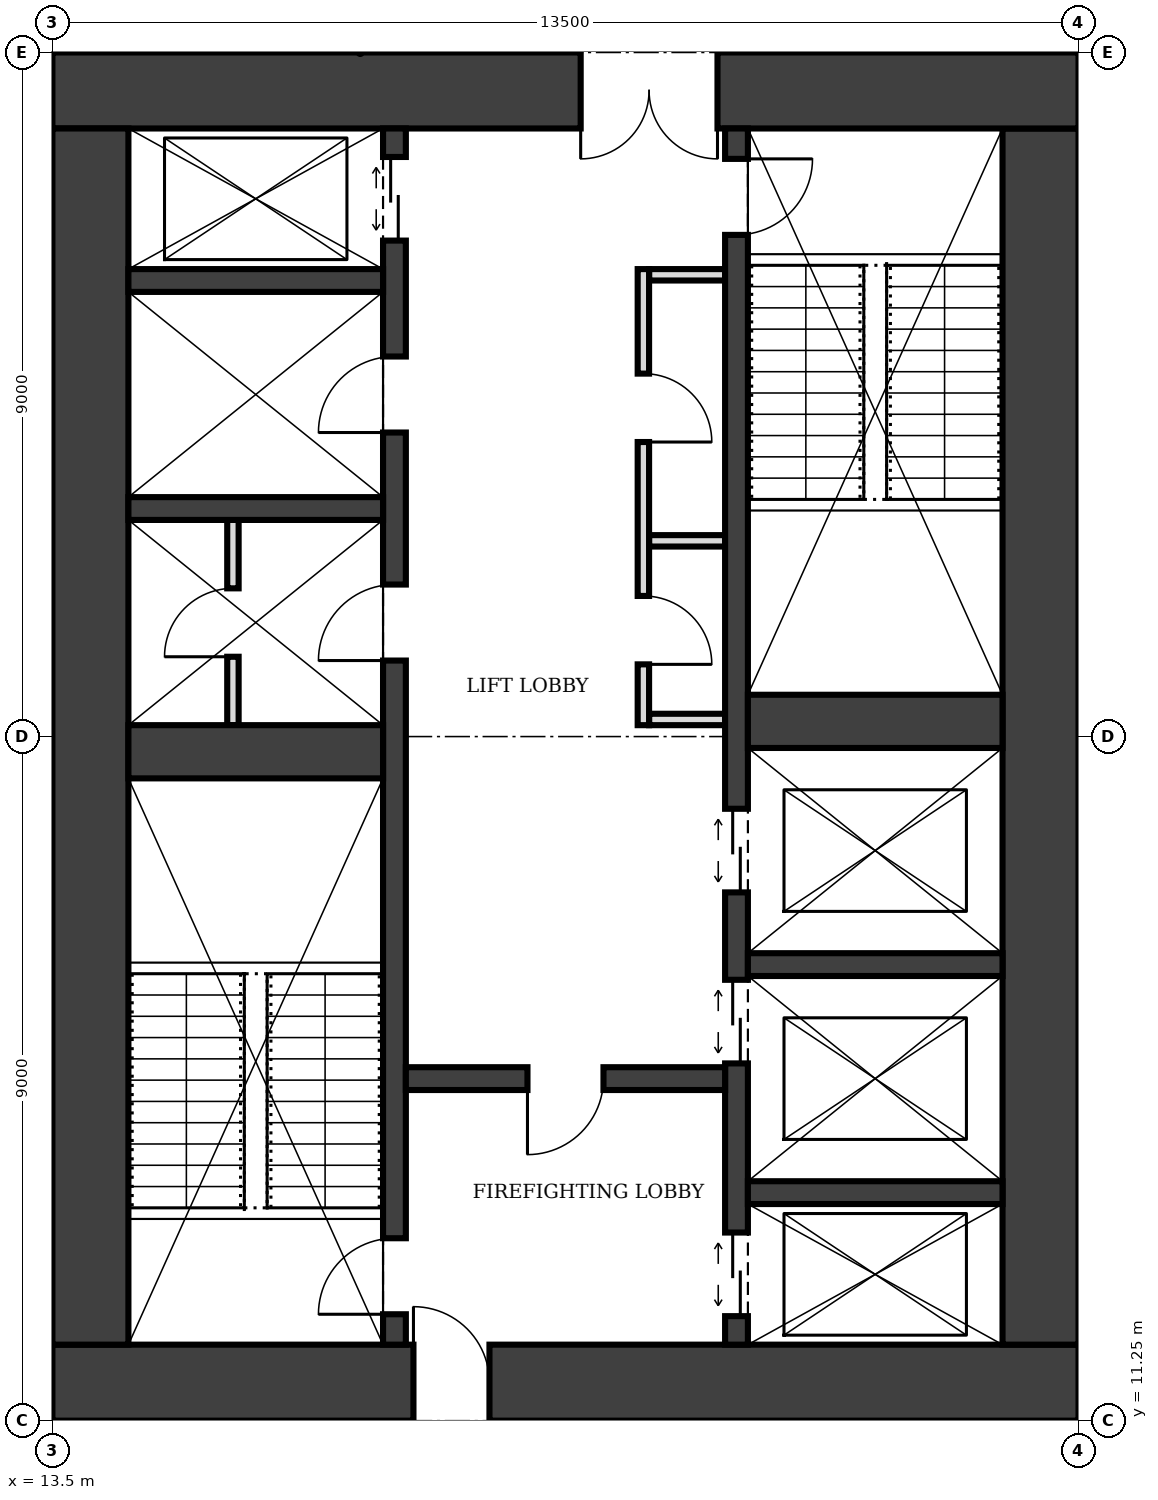
"""IFC4 building model, lengths in metres.
Left out: names, types, materials, properties, quantities, classifications, styles, units other than length and angle.
Written with IfcOpenShell. Run it as: python <this file> out.ifc"""

import sys

from ifc_helpers import new_model, si_unit, direction, frame, frame_2d, origin, place, context, subcontext, project, spatial, rectangle, extrude, element, fill, save


model = new_model("IFC4")
c1 = context("Model", 3, precision=1e-05, world=origin(), true_north=direction((0.0, 1.0)))
c2 = subcontext(c1, "Body", "Model", "MODEL_VIEW")
j1 = project(units=[si_unit("LENGTHUNIT", "METRE"), si_unit("PLANEANGLEUNIT", "RADIAN")], contexts=[c1])
p1 = place(None, origin())
s1 = spatial("IfcSite", under=j1, at=p1, CompositionType="ELEMENT")
p2 = place(p1, origin())
s2 = spatial("IfcBuilding", under=s1, at=p2, CompositionType="ELEMENT")
p3 = place(p2, frame((0.0, 0.0, 277.0)))
s3 = spatial("IfcBuildingStorey", under=s2, at=p3, CompositionType="ELEMENT", Elevation=277.0)
p4 = place(p3, frame((13.5, 11.75, 0.0), z_axis=(0.0, 0.0, 1.0), x_axis=(1.0, 0.0, 0.0)))
e1 = element("IfcWall", 1, at=p4, inside=s3, PredefinedType="SHEAR", context=c2, shape_type="SweptSolid", body=[
    extrude(rectangle(XDim=13.5, YDim=1.0, at=frame_2d((6.75, 0.0))), origin(), (0.0, 0.0, 1.0), 4.0),
])
p5 = place(p4, frame((4.75, 0.0, 0.0)))
e2 = element("IfcOpeningElement", 2, at=p5, cuts=e1, PredefinedType="OPENING", context=c2, shape_type="SweptSolid", body=[
    extrude(rectangle(XDim=1.0, YDim=2.1, at=frame_2d((0.5, 1.05))), frame((0.0, 0.51, 0.0), z_axis=(0.0, -1.0, 0.0), x_axis=(1.0, 0.0, 0.0)), (0.0, 0.0, 1.0), 1.02),
])
p6 = place(p3, frame((26.5, 12.25, 0.0), z_axis=(0.0, 0.0, 1.0), x_axis=(0.0, 1.0, 0.0)))
e3 = element("IfcWall", 3, at=p6, inside=s3, PredefinedType="SHEAR", context=c2, shape_type="SweptSolid", body=[
    extrude(rectangle(XDim=16.0, YDim=1.0, at=frame_2d((8.0, 0.0))), origin(), (0.0, 0.0, 1.0), 4.0),
])
p7 = place(p3, frame((27.0, 28.75, 0.0), z_axis=(0.0, 0.0, 1.0), x_axis=(-1.0, 0.0, 0.0)))
e4 = element("IfcWall", 4, at=p7, inside=s3, PredefinedType="SHEAR", context=c2, shape_type="SweptSolid", body=[
    extrude(rectangle(XDim=13.5, YDim=1.0, at=frame_2d((6.75, 0.0))), origin(), (0.0, 0.0, 1.0), 4.0),
])
p8 = place(p7, frame((4.75, 0.0, 0.0)))
e5 = element("IfcOpeningElement", 5, at=p8, cuts=e4, PredefinedType="OPENING", context=c2, shape_type="SweptSolid", body=[
    extrude(rectangle(XDim=1.8, YDim=2.1, at=frame_2d((0.9, 1.05))), frame((0.0, 0.51, 0.0), z_axis=(0.0, -1.0, 0.0), x_axis=(1.0, 0.0, 0.0)), (0.0, 0.0, 1.0), 1.02),
])
p9 = place(p3, frame((14.0, 28.25, 0.0), z_axis=(0.0, 0.0, 1.0), x_axis=(0.0, -1.0, 0.0)))
e6 = element("IfcWall", 6, at=p9, inside=s3, PredefinedType="SHEAR", context=c2, shape_type="SweptSolid", body=[
    extrude(rectangle(XDim=16.0, YDim=1.0, at=frame_2d((8.0, 0.0))), origin(), (0.0, 0.0, 1.0), 4.0),
])
p10 = place(p3, frame((18.0, 12.25, 0.0), z_axis=(0.0, 0.0, 1.0), x_axis=(0.0, 1.0, 0.0)))
e7 = element("IfcWall", 7, at=p10, inside=s3, PredefinedType="SHEAR", context=c2, shape_type="SweptSolid", body=[
    extrude(rectangle(XDim=16.0, YDim=0.3, at=frame_2d((8.0, 0.0))), origin(), (0.0, 0.0, 1.0), 4.0),
])
p11 = place(p10, frame((0.4, 0.0, 0.0)))
e8 = element("IfcOpeningElement", 8, at=p11, cuts=e7, PredefinedType="OPENING", context=c2, shape_type="SweptSolid", body=[
    extrude(rectangle(XDim=1.0, YDim=2.1, at=frame_2d((0.5, 1.05))), frame((0.0, 0.16, 0.0), z_axis=(0.0, -1.0, 0.0), x_axis=(1.0, 0.0, 0.0)), (0.0, 0.0, 1.0), 0.32),
])
p12 = place(p10, frame((14.525, 0.0, 0.0)))
e9 = element("IfcOpeningElement", 9, at=p12, cuts=e7, PredefinedType="OPENING", context=c2, shape_type="SweptSolid", body=[
    extrude(rectangle(XDim=1.1, YDim=2.1, at=frame_2d((0.55, 1.05))), frame((0.0, 0.16, 0.0), z_axis=(0.0, -1.0, 0.0), x_axis=(1.0, 0.0, 0.0)), (0.0, 0.0, 1.0), 0.32),
])
p13 = place(p10, frame((9.0, 0.0, 0.0)))
e10 = element("IfcOpeningElement", 10, at=p13, cuts=e7, PredefinedType="OPENING", context=c2, shape_type="SweptSolid", body=[
    extrude(rectangle(XDim=1.0, YDim=2.1, at=frame_2d((0.5, 1.05))), frame((0.0, 0.16, 0.0), z_axis=(0.0, -1.0, 0.0), x_axis=(1.0, 0.0, 0.0)), (0.0, 0.0, 1.0), 0.32),
])
p14 = place(p10, frame((12.0, 0.0, 0.0)))
e11 = element("IfcOpeningElement", 11, at=p14, cuts=e7, PredefinedType="OPENING", context=c2, shape_type="SweptSolid", body=[
    extrude(rectangle(XDim=1.0, YDim=2.1, at=frame_2d((0.5, 1.05))), frame((0.0, 0.16, 0.0), z_axis=(0.0, -1.0, 0.0), x_axis=(1.0, 0.0, 0.0)), (0.0, 0.0, 1.0), 0.32),
])
p15 = place(p3, frame((22.5, 12.25, 0.0), z_axis=(0.0, 0.0, 1.0), x_axis=(0.0, 1.0, 0.0)))
e12 = element("IfcWall", 12, at=p15, inside=s3, PredefinedType="SHEAR", context=c2, shape_type="SweptSolid", body=[
    extrude(rectangle(XDim=16.0, YDim=0.3, at=frame_2d((8.0, 0.0))), origin(), (0.0, 0.0, 1.0), 4.0),
])
p16 = place(p15, frame((14.6, 0.0, 0.0)))
e13 = element("IfcOpeningElement", 13, at=p16, cuts=e12, PredefinedType="OPENING", context=c2, shape_type="SweptSolid", body=[
    extrude(rectangle(XDim=1.0, YDim=2.1, at=frame_2d((0.5, 1.05))), frame((0.0, 0.16, 0.0), z_axis=(0.0, -1.0, 0.0), x_axis=(1.0, 0.0, 0.0)), (0.0, 0.0, 1.0), 0.32),
])
p17 = place(p15, frame((0.375, 0.0, 0.0)))
e14 = element("IfcOpeningElement", 14, at=p17, cuts=e12, PredefinedType="OPENING", context=c2, shape_type="SweptSolid", body=[
    extrude(rectangle(XDim=1.1, YDim=2.1, at=frame_2d((0.55, 1.05))), frame((0.0, 0.16, 0.0), z_axis=(0.0, -1.0, 0.0), x_axis=(1.0, 0.0, 0.0)), (0.0, 0.0, 1.0), 0.32),
])
p18 = place(p15, frame((3.7, 0.0, 0.0)))
e15 = element("IfcOpeningElement", 15, at=p18, cuts=e12, PredefinedType="OPENING", context=c2, shape_type="SweptSolid", body=[
    extrude(rectangle(XDim=1.1, YDim=2.1, at=frame_2d((0.55, 1.05))), frame((0.0, 0.16, 0.0), z_axis=(0.0, -1.0, 0.0), x_axis=(1.0, 0.0, 0.0)), (0.0, 0.0, 1.0), 0.32),
])
p19 = place(p15, frame((5.95, 0.0, 0.0)))
e16 = element("IfcOpeningElement", 16, at=p19, cuts=e12, PredefinedType="OPENING", context=c2, shape_type="SweptSolid", body=[
    extrude(rectangle(XDim=1.1, YDim=2.1, at=frame_2d((0.55, 1.05))), frame((0.0, 0.16, 0.0), z_axis=(0.0, -1.0, 0.0), x_axis=(1.0, 0.0, 0.0)), (0.0, 0.0, 1.0), 0.32),
])
p20 = place(p3, frame((14.5, 20.05, 0.0), z_axis=(0.0, 0.0, 1.0), x_axis=(1.0, 0.0, 0.0)))
e17 = element("IfcWall", 17, at=p20, inside=s3, PredefinedType="SHEAR", context=c2, shape_type="SweptSolid", body=[
    extrude(rectangle(XDim=3.35, YDim=0.7, at=frame_2d((1.675, 0.0))), origin(), (0.0, 0.0, 1.0), 4.0),
])
p21 = place(p3, frame((18.15, 15.75, 0.0), z_axis=(0.0, 0.0, 1.0), x_axis=(1.0, 0.0, 0.0)))
e18 = element("IfcWall", 18, at=p21, inside=s3, PredefinedType="SHEAR", context=c2, shape_type="SweptSolid", body=[
    extrude(rectangle(XDim=4.2, YDim=0.3, at=frame_2d((2.1, 0.0))), origin(), (0.0, 0.0, 1.0), 4.0),
])
p22 = place(p21, frame((1.6, 0.0, 0.0)))
e19 = element("IfcOpeningElement", 19, at=p22, cuts=e18, PredefinedType="OPENING", context=c2, shape_type="SweptSolid", body=[
    extrude(rectangle(XDim=1.0, YDim=2.1, at=frame_2d((0.5, 1.05))), frame((0.0, 0.16, 0.0), z_axis=(0.0, -1.0, 0.0), x_axis=(1.0, 0.0, 0.0)), (0.0, 0.0, 1.0), 0.32),
])
for number, where, z_axis, x_axis in (
    (20, (22.65, 14.25, 0.0), (0.0, 0.0, 1.0), (1.0, 0.0, 0.0)),
    (21, (22.65, 17.25, 0.0), (0.0, 0.0, 1.0), (1.0, 0.0, 0.0)),
):
    element("IfcWall", number, at=place(p3, frame(where, z_axis=z_axis, x_axis=x_axis)), inside=s3, PredefinedType="SHEAR", context=c2, shape_type="SweptSolid", body=[
        extrude(rectangle(XDim=3.35, YDim=0.3, at=frame_2d((1.675, 0.0))), origin(), (0.0, 0.0, 1.0), 4.0),
    ])
p23 = place(p3, frame((22.65, 20.45, 0.0), z_axis=(0.0, 0.0, 1.0), x_axis=(1.0, 0.0, 0.0)))
e22 = element("IfcWall", 22, at=p23, inside=s3, PredefinedType="SHEAR", context=c2, shape_type="SweptSolid", body=[
    extrude(rectangle(XDim=3.35, YDim=0.7, at=frame_2d((1.675, 0.0))), origin(), (0.0, 0.0, 1.0), 4.0),
])
for number, where, z_axis, x_axis in (
    (23, (14.5, 23.25, 0.0), (0.0, 0.0, 1.0), (1.0, 0.0, 0.0)),
    (24, (14.5, 26.25, 0.0), (0.0, 0.0, 1.0), (1.0, 0.0, 0.0)),
):
    element("IfcWall", number, at=place(p3, frame(where, z_axis=z_axis, x_axis=x_axis)), inside=s3, PredefinedType="SHEAR", context=c2, shape_type="SweptSolid", body=[
        extrude(rectangle(XDim=3.35, YDim=0.3, at=frame_2d((1.675, 0.0))), origin(), (0.0, 0.0, 1.0), 4.0),
    ])
p24 = place(p3, frame((21.275, 20.4, 0.0), z_axis=(0.0, 0.0, 1.0), x_axis=(0.0, 1.0, 0.0)))
e25 = element("IfcWall", 25, at=p24, inside=s3, PredefinedType="PARTITIONING", context=c2, shape_type="SweptSolid", body=[
    extrude(rectangle(XDim=6.0, YDim=0.15, at=frame_2d((3.0, 0.0))), origin(), (0.0, 0.0, 1.0), 3.75),
])
p25 = place(p24, frame((0.8, 0.0, 0.0)))
e26 = element("IfcOpeningElement", 26, at=p25, cuts=e25, PredefinedType="OPENING", context=c2, shape_type="SweptSolid", body=[
    extrude(rectangle(XDim=0.9, YDim=2.1, at=frame_2d((0.45, 1.05))), frame((0.0, 0.085, 0.0), z_axis=(0.0, -1.0, 0.0), x_axis=(1.0, 0.0, 0.0)), (0.0, 0.0, 1.0), 0.17),
])
p26 = place(p24, frame((3.725, 0.0, 0.0)))
e27 = element("IfcOpeningElement", 27, at=p26, cuts=e25, PredefinedType="OPENING", context=c2, shape_type="SweptSolid", body=[
    extrude(rectangle(XDim=0.9, YDim=2.1, at=frame_2d((0.45, 1.05))), frame((0.0, 0.085, 0.0), z_axis=(0.0, -1.0, 0.0), x_axis=(1.0, 0.0, 0.0)), (0.0, 0.0, 1.0), 0.17),
])
for number, where, z_axis, x_axis in (
    (28, (21.35, 20.475, 0.0), (0.0, 0.0, 1.0), (1.0, 0.0, 0.0)),
    (29, (21.35, 22.825, 0.0), (0.0, 0.0, 1.0), (1.0, 0.0, 0.0)),
    (30, (21.35, 26.325, 0.0), (0.0, 0.0, 1.0), (1.0, 0.0, 0.0)),
):
    element("IfcWall", number, at=place(p3, frame(where, z_axis=z_axis, x_axis=x_axis)), inside=s3, PredefinedType="PARTITIONING", context=c2, shape_type="SweptSolid", body=[
        extrude(rectangle(XDim=1.0, YDim=0.15, at=frame_2d((0.5, 0.0))), origin(), (0.0, 0.0, 1.0), 3.75),
    ])
p27 = place(p3, frame((15.875, 20.4, 0.0), z_axis=(0.0, 0.0, 1.0), x_axis=(0.0, 1.0, 0.0)))
e31 = element("IfcWall", 31, at=p27, inside=s3, PredefinedType="PARTITIONING", context=c2, shape_type="SweptSolid", body=[
    extrude(rectangle(XDim=2.7, YDim=0.15, at=frame_2d((1.35, 0.0))), origin(), (0.0, 0.0, 1.0), 3.75),
])
p28 = place(p27, frame((0.9, 0.0, 0.0)))
e32 = element("IfcOpeningElement", 32, at=p28, cuts=e31, PredefinedType="OPENING", context=c2, shape_type="SweptSolid", body=[
    extrude(rectangle(XDim=0.9, YDim=2.1, at=frame_2d((0.45, 1.05))), frame((0.0, 0.085, 0.0), z_axis=(0.0, -1.0, 0.0), x_axis=(1.0, 0.0, 0.0)), (0.0, 0.0, 1.0), 0.17),
])
p29 = place(p5, origin())
e33 = element("IfcDoor", 33, at=p29, inside=s3, OperationType="SINGLE_SWING_LEFT", PredefinedType="DOOR", context=c2, shape_type="SweptSolid", body=[
    extrude(rectangle(XDim=1.0, YDim=2.1, at=frame_2d((0.5, 1.05))), frame((0.0, 0.025, 0.0), z_axis=(0.0, -1.0, 0.0), x_axis=(1.0, 0.0, 0.0)), (0.0, 0.0, 1.0), 0.05),
])
fill(e2, e33)
p30 = place(p8, origin())
e34 = element("IfcDoor", 34, at=p30, inside=s3, OperationType="DOUBLE_DOOR_SINGLE_SWING", PredefinedType="DOOR", context=c2, shape_type="SweptSolid", body=[
    extrude(rectangle(XDim=1.8, YDim=2.1, at=frame_2d((0.9, 1.05))), frame((0.0, 0.025, 0.0), z_axis=(0.0, -1.0, 0.0), x_axis=(1.0, 0.0, 0.0)), (0.0, 0.0, 1.0), 0.05),
])
fill(e5, e34)
p31 = place(p22, frame((1.0, 0.0, 0.0), z_axis=(0.0, 0.0, 1.0), x_axis=(-1.0, 0.0, 0.0)))
e35 = element("IfcDoor", 35, at=p31, inside=s3, OperationType="SINGLE_SWING_RIGHT", PredefinedType="DOOR", context=c2, shape_type="SweptSolid", body=[
    extrude(rectangle(XDim=1.0, YDim=2.1, at=frame_2d((0.5, 1.05))), frame((0.0, 0.025, 0.0), z_axis=(0.0, -1.0, 0.0), x_axis=(1.0, 0.0, 0.0)), (0.0, 0.0, 1.0), 0.05),
])
fill(e19, e35)
p32 = place(p11, origin())
e36 = element("IfcDoor", 36, at=p32, inside=s3, OperationType="SINGLE_SWING_LEFT", PredefinedType="DOOR", context=c2, shape_type="SweptSolid", body=[
    extrude(rectangle(XDim=1.0, YDim=2.1, at=frame_2d((0.5, 1.05))), frame((0.0, 0.025, 0.0), z_axis=(0.0, -1.0, 0.0), x_axis=(1.0, 0.0, 0.0)), (0.0, 0.0, 1.0), 0.05),
])
fill(e8, e36)
p33 = place(p16, frame((1.0, 0.0, 0.0), z_axis=(0.0, 0.0, 1.0), x_axis=(-1.0, 0.0, 0.0)))
e37 = element("IfcDoor", 37, at=p33, inside=s3, OperationType="SINGLE_SWING_LEFT", PredefinedType="DOOR", context=c2, shape_type="SweptSolid", body=[
    extrude(rectangle(XDim=1.0, YDim=2.1, at=frame_2d((0.5, 1.05))), frame((0.0, 0.025, 0.0), z_axis=(0.0, -1.0, 0.0), x_axis=(1.0, 0.0, 0.0)), (0.0, 0.0, 1.0), 0.05),
])
fill(e13, e37)
p34 = place(p17, origin())
e38 = element("IfcDoor", 38, at=p34, inside=s3, OperationType="DOUBLE_DOOR_SLIDING", PredefinedType="DOOR", context=c2, shape_type="SweptSolid", body=[
    extrude(rectangle(XDim=1.1, YDim=2.1, at=frame_2d((0.55, 1.05))), frame((0.0, 0.025, 0.0), z_axis=(0.0, -1.0, 0.0), x_axis=(1.0, 0.0, 0.0)), (0.0, 0.0, 1.0), 0.05),
])
fill(e14, e38)
p35 = place(p12, origin())
e39 = element("IfcDoor", 39, at=p35, inside=s3, OperationType="DOUBLE_DOOR_SLIDING", PredefinedType="DOOR", context=c2, shape_type="SweptSolid", body=[
    extrude(rectangle(XDim=1.1, YDim=2.1, at=frame_2d((0.55, 1.05))), frame((0.0, 0.025, 0.0), z_axis=(0.0, -1.0, 0.0), x_axis=(1.0, 0.0, 0.0)), (0.0, 0.0, 1.0), 0.05),
])
fill(e9, e39)
p36 = place(p18, origin())
e40 = element("IfcDoor", 40, at=p36, inside=s3, OperationType="DOUBLE_DOOR_SLIDING", PredefinedType="DOOR", context=c2, shape_type="SweptSolid", body=[
    extrude(rectangle(XDim=1.1, YDim=2.1, at=frame_2d((0.55, 1.05))), frame((0.0, 0.025, 0.0), z_axis=(0.0, -1.0, 0.0), x_axis=(1.0, 0.0, 0.0)), (0.0, 0.0, 1.0), 0.05),
])
fill(e15, e40)
p37 = place(p19, origin())
e41 = element("IfcDoor", 41, at=p37, inside=s3, OperationType="DOUBLE_DOOR_SLIDING", PredefinedType="DOOR", context=c2, shape_type="SweptSolid", body=[
    extrude(rectangle(XDim=1.1, YDim=2.1, at=frame_2d((0.55, 1.05))), frame((0.0, 0.025, 0.0), z_axis=(0.0, -1.0, 0.0), x_axis=(1.0, 0.0, 0.0)), (0.0, 0.0, 1.0), 0.05),
])
fill(e16, e41)
p38 = place(p25, frame((0.9, 0.0, 0.0), z_axis=(0.0, 0.0, 1.0), x_axis=(-1.0, 0.0, 0.0)))
e42 = element("IfcDoor", 42, at=p38, inside=s3, OperationType="SINGLE_SWING_RIGHT", PredefinedType="DOOR", context=c2, shape_type="SweptSolid", body=[
    extrude(rectangle(XDim=0.9, YDim=2.1, at=frame_2d((0.45, 1.05))), frame((0.0, 0.025, 0.0), z_axis=(0.0, -1.0, 0.0), x_axis=(1.0, 0.0, 0.0)), (0.0, 0.0, 1.0), 0.05),
])
fill(e26, e42)
p39 = place(p26, frame((0.9, 0.0, 0.0), z_axis=(0.0, 0.0, 1.0), x_axis=(-1.0, 0.0, 0.0)))
e43 = element("IfcDoor", 43, at=p39, inside=s3, OperationType="SINGLE_SWING_RIGHT", PredefinedType="DOOR", context=c2, shape_type="SweptSolid", body=[
    extrude(rectangle(XDim=0.9, YDim=2.1, at=frame_2d((0.45, 1.05))), frame((0.0, 0.025, 0.0), z_axis=(0.0, -1.0, 0.0), x_axis=(1.0, 0.0, 0.0)), (0.0, 0.0, 1.0), 0.05),
])
fill(e27, e43)
p40 = place(p13, origin())
e44 = element("IfcDoor", 44, at=p40, inside=s3, OperationType="SINGLE_SWING_LEFT", PredefinedType="DOOR", context=c2, shape_type="SweptSolid", body=[
    extrude(rectangle(XDim=1.0, YDim=2.1, at=frame_2d((0.5, 1.05))), frame((0.0, 0.025, 0.0), z_axis=(0.0, -1.0, 0.0), x_axis=(1.0, 0.0, 0.0)), (0.0, 0.0, 1.0), 0.05),
])
fill(e10, e44)
p41 = place(p28, origin())
e45 = element("IfcDoor", 45, at=p41, inside=s3, OperationType="SINGLE_SWING_LEFT", PredefinedType="DOOR", context=c2, shape_type="SweptSolid", body=[
    extrude(rectangle(XDim=0.9, YDim=2.1, at=frame_2d((0.45, 1.05))), frame((0.0, 0.025, 0.0), z_axis=(0.0, -1.0, 0.0), x_axis=(1.0, 0.0, 0.0)), (0.0, 0.0, 1.0), 0.05),
])
fill(e32, e45)
p42 = place(p14, origin())
e46 = element("IfcDoor", 46, at=p42, inside=s3, OperationType="SINGLE_SWING_LEFT", PredefinedType="DOOR", context=c2, shape_type="SweptSolid", body=[
    extrude(rectangle(XDim=1.0, YDim=2.1, at=frame_2d((0.5, 1.05))), frame((0.0, 0.025, 0.0), z_axis=(0.0, -1.0, 0.0), x_axis=(1.0, 0.0, 0.0)), (0.0, 0.0, 1.0), 0.05),
])
fill(e11, e46)
save(model, sys.argv[1])
